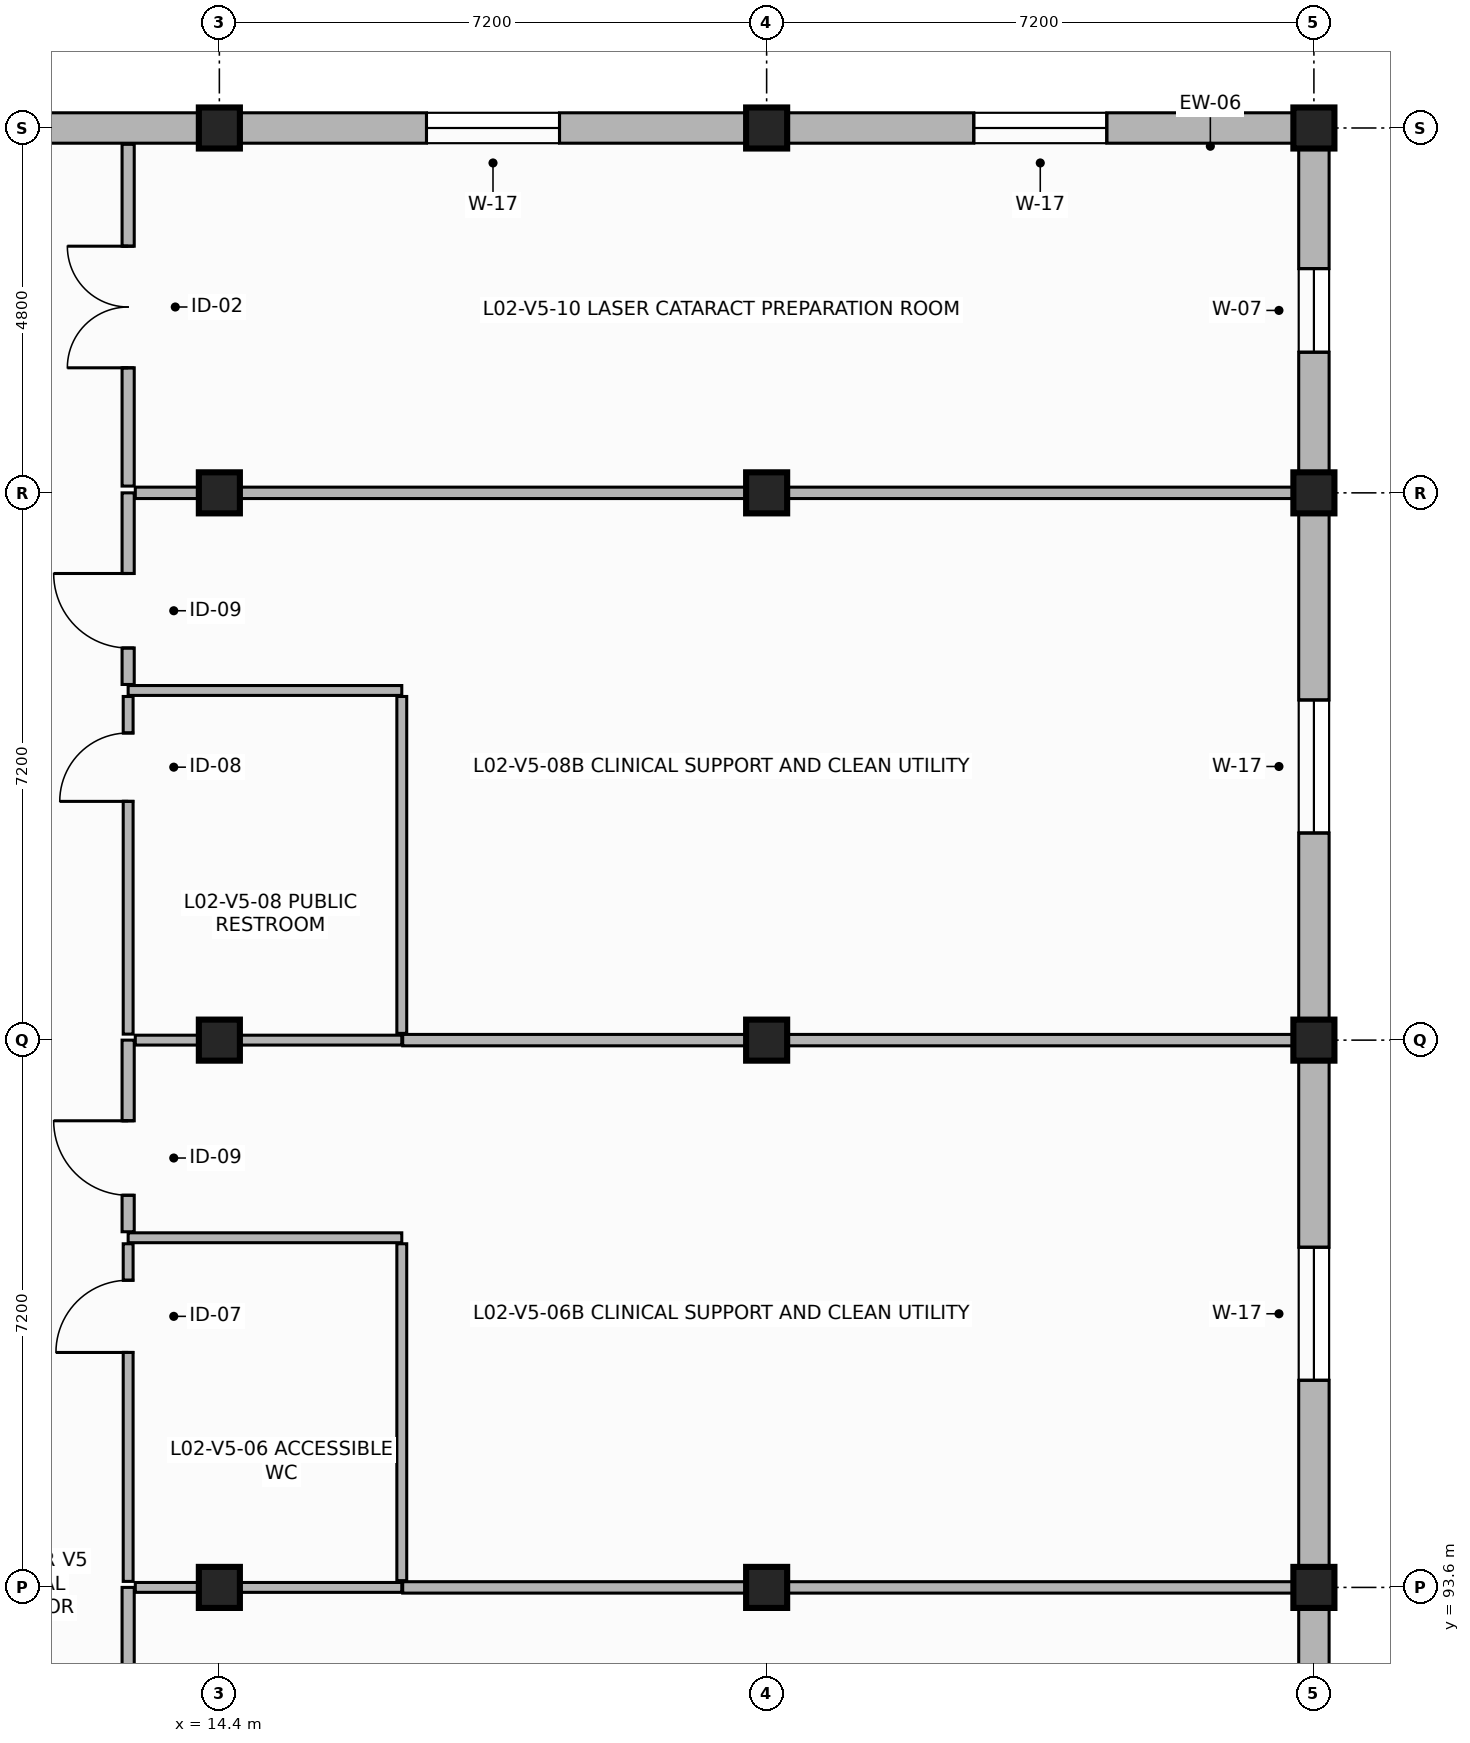
"""IFC4 building model, lengths in metres.
Left out: names, types, materials, properties, quantities, classifications, styles, units other than length and angle.
Written with IfcOpenShell. Run it as: python <this file> out.ifc"""

import sys

from ifc_helpers import new_model, si_unit, direction, frame, frame_2d, origin, origin_2d, place, context, subcontext, project, spatial, rectangle, extrude, element, fill, save


model = new_model("IFC4")
c1 = context("Model", 3, precision=1e-05, world=origin(), true_north=direction((0.0, 1.0)))
c2 = subcontext(c1, "Body", "Model", "MODEL_VIEW")
j1 = project(units=[si_unit("LENGTHUNIT", "METRE"), si_unit("PLANEANGLEUNIT", "RADIAN")], contexts=[c1])
p1 = place(None, origin())
s1 = spatial("IfcSite", under=j1, at=p1, CompositionType="ELEMENT")
p2 = place(p1, origin())
s2 = spatial("IfcBuilding", under=s1, at=p2, CompositionType="ELEMENT")
p3 = place(p2, frame((0.0, 0.0, 8.4)))
s3 = spatial("IfcBuildingStorey", under=s2, at=p3, CompositionType="ELEMENT", Elevation=8.4)
for number, where, z_axis, x_axis in (
    (1, (14.4, 93.6, 0.0), (0.0, 0.0, 1.0), (1.0, 0.0, 0.0)),
    (2, (14.4, 100.8, 0.0), (0.0, 0.0, 1.0), (1.0, 0.0, 0.0)),
    (3, (14.4, 108.0, 0.0), (0.0, 0.0, 1.0), (1.0, 0.0, 0.0)),
    (4, (14.4, 112.8, 0.0), (0.0, 0.0, 1.0), (1.0, 0.0, 0.0)),
    (5, (21.6, 93.6, 0.0), (0.0, 0.0, 1.0), (1.0, 0.0, 0.0)),
    (6, (21.6, 100.8, 0.0), (0.0, 0.0, 1.0), (1.0, 0.0, 0.0)),
    (7, (21.6, 108.0, 0.0), (0.0, 0.0, 1.0), (1.0, 0.0, 0.0)),
    (8, (21.6, 112.8, 0.0), (0.0, 0.0, 1.0), (1.0, 0.0, 0.0)),
    (9, (28.8, 93.6, 0.0), (0.0, 0.0, 1.0), (1.0, 0.0, 0.0)),
    (10, (28.8, 100.8, 0.0), (0.0, 0.0, 1.0), (1.0, 0.0, 0.0)),
    (11, (28.8, 108.0, 0.0), (0.0, 0.0, 1.0), (1.0, 0.0, 0.0)),
    (12, (28.8, 112.8, 0.0), (0.0, 0.0, 1.0), (1.0, 0.0, 0.0)),
):
    element("IfcColumn", number, at=place(p3, frame(where, z_axis=z_axis, x_axis=x_axis)), inside=s3, PredefinedType="COLUMN", context=c2, shape_type="SweptSolid", body=[
        extrude(rectangle(XDim=0.54, YDim=0.54, at=origin_2d()), origin(), (0.0, 0.0, 1.0), 3.59),
    ])
p4 = place(p3, frame((28.8, 86.4, 0.0), z_axis=(0.0, 0.0, 1.0), x_axis=(0.0, 1.0, 0.0)))
e13 = element("IfcWall", 13, at=p4, inside=s3, PredefinedType="SOLIDWALL", context=c2, shape_type="SweptSolid", body=[
    extrude(rectangle(XDim=7.2, YDim=0.4, at=frame_2d((3.6, 0.0))), origin(), (0.0, 0.0, 1.0), 2.92),
])
p5 = place(p4, frame((2.725, 0.0, 0.9)))
e14 = element("IfcOpeningElement", 14, at=p5, cuts=e13, PredefinedType="OPENING", context=c2, shape_type="SweptSolid", body=[
    extrude(rectangle(XDim=1.75, YDim=1.8, at=frame_2d((0.875, 0.9))), frame((0.0, 0.21, 0.0), z_axis=(0.0, -1.0, 0.0), x_axis=(1.0, 0.0, 0.0)), (0.0, 0.0, 1.0), 0.42),
])
p6 = place(p3, frame((28.8, 93.6, 0.0), z_axis=(0.0, 0.0, 1.0), x_axis=(0.0, 1.0, 0.0)))
e15 = element("IfcWall", 15, at=p6, inside=s3, PredefinedType="SOLIDWALL", context=c2, shape_type="SweptSolid", body=[
    extrude(rectangle(XDim=7.2, YDim=0.4, at=frame_2d((3.6, 0.0))), origin(), (0.0, 0.0, 1.0), 2.92),
])
p7 = place(p6, frame((2.725, 0.0, 0.9)))
e16 = element("IfcOpeningElement", 16, at=p7, cuts=e15, PredefinedType="OPENING", context=c2, shape_type="SweptSolid", body=[
    extrude(rectangle(XDim=1.75, YDim=1.8, at=frame_2d((0.875, 0.9))), frame((0.0, 0.21, 0.0), z_axis=(0.0, -1.0, 0.0), x_axis=(1.0, 0.0, 0.0)), (0.0, 0.0, 1.0), 0.42),
])
p8 = place(p3, frame((28.8, 100.8, 0.0), z_axis=(0.0, 0.0, 1.0), x_axis=(0.0, 1.0, 0.0)))
e17 = element("IfcWall", 17, at=p8, inside=s3, PredefinedType="SOLIDWALL", context=c2, shape_type="SweptSolid", body=[
    extrude(rectangle(XDim=7.2, YDim=0.4, at=frame_2d((3.6, 0.0))), origin(), (0.0, 0.0, 1.0), 2.92),
])
p9 = place(p8, frame((2.725, 0.0, 0.9)))
e18 = element("IfcOpeningElement", 18, at=p9, cuts=e17, PredefinedType="OPENING", context=c2, shape_type="SweptSolid", body=[
    extrude(rectangle(XDim=1.75, YDim=1.8, at=frame_2d((0.875, 0.9))), frame((0.0, 0.21, 0.0), z_axis=(0.0, -1.0, 0.0), x_axis=(1.0, 0.0, 0.0)), (0.0, 0.0, 1.0), 0.42),
])
p10 = place(p3, frame((28.8, 108.0, 0.0), z_axis=(0.0, 0.0, 1.0), x_axis=(0.0, 1.0, 0.0)))
e19 = element("IfcWall", 19, at=p10, inside=s3, PredefinedType="SOLIDWALL", context=c2, shape_type="SweptSolid", body=[
    extrude(rectangle(XDim=4.8, YDim=0.4, at=frame_2d((2.4, 0.0))), origin(), (0.0, 0.0, 1.0), 2.92),
])
p11 = place(p10, frame((1.85, 0.0, 0.85)))
e20 = element("IfcOpeningElement", 20, at=p11, cuts=e19, PredefinedType="OPENING", context=c2, shape_type="SweptSolid", body=[
    extrude(rectangle(XDim=1.1, YDim=1.85, at=frame_2d((0.55, 0.925))), frame((0.0, 0.21, 0.0), z_axis=(0.0, -1.0, 0.0), x_axis=(1.0, 0.0, 0.0)), (0.0, 0.0, 1.0), 0.42),
])
p12 = place(p3, frame((28.8, 112.8, 0.0), z_axis=(0.0, 0.0, 1.0), x_axis=(-1.0, 0.0, 0.0)))
e21 = element("IfcWall", 21, at=p12, inside=s3, PredefinedType="SOLIDWALL", context=c2, shape_type="SweptSolid", body=[
    extrude(rectangle(XDim=7.2, YDim=0.4, at=frame_2d((3.6, 0.0))), origin(), (0.0, 0.0, 1.0), 2.92),
])
p13 = place(p12, frame((2.725, 0.0, 0.9)))
e22 = element("IfcOpeningElement", 22, at=p13, cuts=e21, PredefinedType="OPENING", context=c2, shape_type="SweptSolid", body=[
    extrude(rectangle(XDim=1.75, YDim=1.8, at=frame_2d((0.875, 0.9))), frame((0.0, 0.21, 0.0), z_axis=(0.0, -1.0, 0.0), x_axis=(1.0, 0.0, 0.0)), (0.0, 0.0, 1.0), 0.42),
])
p14 = place(p3, frame((21.6, 112.8, 0.0), z_axis=(0.0, 0.0, 1.0), x_axis=(-1.0, 0.0, 0.0)))
e23 = element("IfcWall", 23, at=p14, inside=s3, PredefinedType="SOLIDWALL", context=c2, shape_type="SweptSolid", body=[
    extrude(rectangle(XDim=7.2, YDim=0.4, at=frame_2d((3.6, 0.0))), origin(), (0.0, 0.0, 1.0), 2.92),
])
p15 = place(p14, frame((2.725, 0.0, 0.9)))
e24 = element("IfcOpeningElement", 24, at=p15, cuts=e23, PredefinedType="OPENING", context=c2, shape_type="SweptSolid", body=[
    extrude(rectangle(XDim=1.75, YDim=1.8, at=frame_2d((0.875, 0.9))), frame((0.0, 0.21, 0.0), z_axis=(0.0, -1.0, 0.0), x_axis=(1.0, 0.0, 0.0)), (0.0, 0.0, 1.0), 0.42),
])
p16 = place(p3, frame((14.4, 112.8, 0.0), z_axis=(0.0, 0.0, 1.0), x_axis=(-1.0, 0.0, 0.0)))
e25 = element("IfcWall", 25, at=p16, inside=s3, PredefinedType="SOLIDWALL", context=c2, shape_type="SweptSolid", body=[
    extrude(rectangle(XDim=7.2, YDim=0.4, at=frame_2d((3.6, 0.0))), origin(), (0.0, 0.0, 1.0), 2.92),
])
p17 = place(p16, frame((4.725, 0.0, 0.9)))
e26 = element("IfcOpeningElement", 26, at=p17, cuts=e25, PredefinedType="OPENING", context=c2, shape_type="SweptSolid", body=[
    extrude(rectangle(XDim=1.75, YDim=1.8, at=frame_2d((0.875, 0.9))), frame((0.0, 0.21, 0.0), z_axis=(0.0, -1.0, 0.0), x_axis=(1.0, 0.0, 0.0)), (0.0, 0.0, 1.0), 0.42),
])
p18 = place(p3, frame((13.2, 86.509, 0.0), z_axis=(0.0, 0.0, 1.0), x_axis=(0.0, 1.0, 0.0)))
e27 = element("IfcWall", 27, at=p18, inside=s3, PredefinedType="PARTITIONING", context=c2, shape_type="SweptSolid", body=[
    extrude(rectangle(XDim=7.091, YDim=0.16, at=frame_2d((3.545, 0.0))), origin(), (0.0, 0.0, 1.0), 2.9),
])
p19 = place(p18, frame((3.055, 0.0, 0.0)))
e28 = element("IfcOpeningElement", 28, at=p19, cuts=e27, PredefinedType="OPENING", context=c2, shape_type="SweptSolid", body=[
    extrude(rectangle(XDim=0.98, YDim=2.15, at=frame_2d((0.49, 1.075))), frame((0.0, 0.09, 0.0), z_axis=(0.0, -1.0, 0.0), x_axis=(1.0, 0.0, 0.0)), (0.0, 0.0, 1.0), 0.18),
])
p20 = place(p3, frame((13.294, 93.6, 0.0), z_axis=(0.0, 0.0, 1.0), x_axis=(1.0, 0.0, 0.0)))
e29 = element("IfcWall", 29, at=p20, inside=s3, PredefinedType="PARTITIONING", context=c2, shape_type="SweptSolid", body=[
    extrude(rectangle(XDim=3.506, YDim=0.13, at=frame_2d((1.753, 0.0))), origin(), (0.0, 0.0, 1.0), 2.9),
])
p21 = place(p3, frame((16.812, 93.6, 0.0), z_axis=(0.0, 0.0, 1.0), x_axis=(1.0, 0.0, 0.0)))
e30 = element("IfcWall", 30, at=p21, inside=s3, PredefinedType="PARTITIONING", context=c2, shape_type="SweptSolid", body=[
    extrude(rectangle(XDim=11.773, YDim=0.15, at=frame_2d((5.886, 0.0))), origin(), (0.0, 0.0, 1.0), 2.9),
])
p22 = place(p3, frame((13.2, 98.2, 0.0), z_axis=(0.0, 0.0, 1.0), x_axis=(1.0, 0.0, 0.0)))
e31 = element("IfcWall", 31, at=p22, inside=s3, PredefinedType="PARTITIONING", context=c2, shape_type="SweptSolid", body=[
    extrude(rectangle(XDim=3.6, YDim=0.13, at=frame_2d((1.8, 0.0))), origin(), (0.0, 0.0, 1.0), 2.9),
])
p23 = place(p3, frame((16.8, 98.121, 0.0), z_axis=(0.0, 0.0, 1.0), x_axis=(0.0, -1.0, 0.0)))
e32 = element("IfcWall", 32, at=p23, inside=s3, PredefinedType="PARTITIONING", context=c2, shape_type="SweptSolid", body=[
    extrude(rectangle(XDim=4.432, YDim=0.13, at=frame_2d((2.216, 0.0))), origin(), (0.0, 0.0, 1.0), 2.9),
])
p24 = place(p3, frame((13.2, 93.679, 0.0), z_axis=(0.0, 0.0, 1.0), x_axis=(0.0, 1.0, 0.0)))
e33 = element("IfcWall", 33, at=p24, inside=s3, PredefinedType="PARTITIONING", context=c2, shape_type="SweptSolid", body=[
    extrude(rectangle(XDim=4.442, YDim=0.13, at=frame_2d((2.221, 0.0))), origin(), (0.0, 0.0, 1.0), 2.9),
])
p25 = place(p24, frame((3.012, 0.0, 0.0)))
e34 = element("IfcOpeningElement", 34, at=p25, cuts=e33, PredefinedType="OPENING", context=c2, shape_type="SweptSolid", body=[
    extrude(rectangle(XDim=0.95, YDim=2.1, at=frame_2d((0.475, 1.05))), frame((0.0, 0.075, 0.0), z_axis=(0.0, -1.0, 0.0), x_axis=(1.0, 0.0, 0.0)), (0.0, 0.0, 1.0), 0.15),
])
p26 = place(p3, frame((13.2, 98.279, 0.0), z_axis=(0.0, 0.0, 1.0), x_axis=(0.0, 1.0, 0.0)))
e35 = element("IfcWall", 35, at=p26, inside=s3, PredefinedType="PARTITIONING", context=c2, shape_type="SweptSolid", body=[
    extrude(rectangle(XDim=2.521, YDim=0.16, at=frame_2d((1.26, 0.0))), origin(), (0.0, 0.0, 1.0), 2.9),
])
p27 = place(p26, frame((0.48, 0.0, 0.0)))
e36 = element("IfcOpeningElement", 36, at=p27, cuts=e35, PredefinedType="OPENING", context=c2, shape_type="SweptSolid", body=[
    extrude(rectangle(XDim=0.98, YDim=2.15, at=frame_2d((0.49, 1.075))), frame((0.0, 0.09, 0.0), z_axis=(0.0, -1.0, 0.0), x_axis=(1.0, 0.0, 0.0)), (0.0, 0.0, 1.0), 0.18),
])
p28 = place(p3, frame((13.294, 100.8, 0.0), z_axis=(0.0, 0.0, 1.0), x_axis=(1.0, 0.0, 0.0)))
e37 = element("IfcWall", 37, at=p28, inside=s3, PredefinedType="PARTITIONING", context=c2, shape_type="SweptSolid", body=[
    extrude(rectangle(XDim=3.506, YDim=0.13, at=frame_2d((1.753, 0.0))), origin(), (0.0, 0.0, 1.0), 2.9),
])
p29 = place(p3, frame((16.812, 100.8, 0.0), z_axis=(0.0, 0.0, 1.0), x_axis=(1.0, 0.0, 0.0)))
e38 = element("IfcWall", 38, at=p29, inside=s3, PredefinedType="PARTITIONING", context=c2, shape_type="SweptSolid", body=[
    extrude(rectangle(XDim=11.773, YDim=0.15, at=frame_2d((5.886, 0.0))), origin(), (0.0, 0.0, 1.0), 2.9),
])
p30 = place(p3, frame((13.2, 105.4, 0.0), z_axis=(0.0, 0.0, 1.0), x_axis=(1.0, 0.0, 0.0)))
e39 = element("IfcWall", 39, at=p30, inside=s3, PredefinedType="PARTITIONING", context=c2, shape_type="SweptSolid", body=[
    extrude(rectangle(XDim=3.6, YDim=0.13, at=frame_2d((1.8, 0.0))), origin(), (0.0, 0.0, 1.0), 2.9),
])
p31 = place(p3, frame((16.8, 105.321, 0.0), z_axis=(0.0, 0.0, 1.0), x_axis=(0.0, -1.0, 0.0)))
e40 = element("IfcWall", 40, at=p31, inside=s3, PredefinedType="PARTITIONING", context=c2, shape_type="SweptSolid", body=[
    extrude(rectangle(XDim=4.432, YDim=0.13, at=frame_2d((2.216, 0.0))), origin(), (0.0, 0.0, 1.0), 2.9),
])
p32 = place(p3, frame((13.2, 100.879, 0.0), z_axis=(0.0, 0.0, 1.0), x_axis=(0.0, 1.0, 0.0)))
e41 = element("IfcWall", 41, at=p32, inside=s3, PredefinedType="PARTITIONING", context=c2, shape_type="SweptSolid", body=[
    extrude(rectangle(XDim=4.442, YDim=0.13, at=frame_2d((2.221, 0.0))), origin(), (0.0, 0.0, 1.0), 2.9),
])
p33 = place(p32, frame((3.062, 0.0, 0.0)))
e42 = element("IfcOpeningElement", 42, at=p33, cuts=e41, PredefinedType="OPENING", context=c2, shape_type="SweptSolid", body=[
    extrude(rectangle(XDim=0.9, YDim=2.1, at=frame_2d((0.45, 1.05))), frame((0.0, 0.075, 0.0), z_axis=(0.0, -1.0, 0.0), x_axis=(1.0, 0.0, 0.0)), (0.0, 0.0, 1.0), 0.15),
])
p34 = place(p3, frame((13.2, 105.479, 0.0), z_axis=(0.0, 0.0, 1.0), x_axis=(0.0, 1.0, 0.0)))
e43 = element("IfcWall", 43, at=p34, inside=s3, PredefinedType="PARTITIONING", context=c2, shape_type="SweptSolid", body=[
    extrude(rectangle(XDim=2.521, YDim=0.16, at=frame_2d((1.26, 0.0))), origin(), (0.0, 0.0, 1.0), 2.9),
])
p35 = place(p34, frame((0.48, 0.0, 0.0)))
e44 = element("IfcOpeningElement", 44, at=p35, cuts=e43, PredefinedType="OPENING", context=c2, shape_type="SweptSolid", body=[
    extrude(rectangle(XDim=0.98, YDim=2.15, at=frame_2d((0.49, 1.075))), frame((0.0, 0.09, 0.0), z_axis=(0.0, -1.0, 0.0), x_axis=(1.0, 0.0, 0.0)), (0.0, 0.0, 1.0), 0.18),
])
p36 = place(p3, frame((13.294, 108.0, 0.0), z_axis=(0.0, 0.0, 1.0), x_axis=(1.0, 0.0, 0.0)))
e45 = element("IfcWall", 45, at=p36, inside=s3, PredefinedType="PARTITIONING", context=c2, shape_type="SweptSolid", body=[
    extrude(rectangle(XDim=15.291, YDim=0.15, at=frame_2d((7.646, 0.0))), origin(), (0.0, 0.0, 1.0), 2.9),
])
p37 = place(p3, frame((13.2, 108.089, 0.0), z_axis=(0.0, 0.0, 1.0), x_axis=(0.0, 1.0, 0.0)))
e46 = element("IfcWall", 46, at=p37, inside=s3, PredefinedType="PARTITIONING", context=c2, shape_type="SweptSolid", body=[
    extrude(rectangle(XDim=4.496, YDim=0.16, at=frame_2d((2.248, 0.0))), origin(), (0.0, 0.0, 1.0), 2.9),
])
p38 = place(p37, frame((1.556, 0.0, 0.0)))
e47 = element("IfcOpeningElement", 47, at=p38, cuts=e46, PredefinedType="OPENING", context=c2, shape_type="SweptSolid", body=[
    extrude(rectangle(XDim=1.6, YDim=2.3, at=frame_2d((0.8, 1.15))), frame((0.0, 0.09, 0.0), z_axis=(0.0, -1.0, 0.0), x_axis=(1.0, 0.0, 0.0)), (0.0, 0.0, 1.0), 0.18),
])
p39 = place(p7, origin())
e48 = element("IfcWindow", 48, at=p39, inside=s3, PartitioningType="SINGLE_PANEL", PredefinedType="WINDOW", context=c2, shape_type="SweptSolid", body=[
    extrude(rectangle(XDim=1.75, YDim=1.8, at=frame_2d((0.875, 0.9))), frame((0.0, 0.03, 0.0), z_axis=(0.0, -1.0, 0.0), x_axis=(1.0, 0.0, 0.0)), (0.0, 0.0, 1.0), 0.06),
])
fill(e16, e48)
p40 = place(p9, origin())
e49 = element("IfcWindow", 49, at=p40, inside=s3, PartitioningType="SINGLE_PANEL", PredefinedType="WINDOW", context=c2, shape_type="SweptSolid", body=[
    extrude(rectangle(XDim=1.75, YDim=1.8, at=frame_2d((0.875, 0.9))), frame((0.0, 0.03, 0.0), z_axis=(0.0, -1.0, 0.0), x_axis=(1.0, 0.0, 0.0)), (0.0, 0.0, 1.0), 0.06),
])
fill(e18, e49)
p41 = place(p11, origin())
e50 = element("IfcWindow", 50, at=p41, inside=s3, PartitioningType="SINGLE_PANEL", PredefinedType="WINDOW", context=c2, shape_type="SweptSolid", body=[
    extrude(rectangle(XDim=1.1, YDim=1.85, at=frame_2d((0.55, 0.925))), frame((0.0, 0.03, 0.0), z_axis=(0.0, -1.0, 0.0), x_axis=(1.0, 0.0, 0.0)), (0.0, 0.0, 1.0), 0.06),
])
fill(e20, e50)
p42 = place(p13, origin())
e51 = element("IfcWindow", 51, at=p42, inside=s3, PartitioningType="SINGLE_PANEL", PredefinedType="WINDOW", context=c2, shape_type="SweptSolid", body=[
    extrude(rectangle(XDim=1.75, YDim=1.8, at=frame_2d((0.875, 0.9))), frame((0.0, 0.03, 0.0), z_axis=(0.0, -1.0, 0.0), x_axis=(1.0, 0.0, 0.0)), (0.0, 0.0, 1.0), 0.06),
])
fill(e22, e51)
p43 = place(p15, origin())
e52 = element("IfcWindow", 52, at=p43, inside=s3, PartitioningType="SINGLE_PANEL", PredefinedType="WINDOW", context=c2, shape_type="SweptSolid", body=[
    extrude(rectangle(XDim=1.75, YDim=1.8, at=frame_2d((0.875, 0.9))), frame((0.0, 0.03, 0.0), z_axis=(0.0, -1.0, 0.0), x_axis=(1.0, 0.0, 0.0)), (0.0, 0.0, 1.0), 0.06),
])
fill(e24, e52)
p44 = place(p25, origin())
e53 = element("IfcDoor", 53, at=p44, inside=s3, OperationType="SINGLE_SWING_LEFT", PredefinedType="DOOR", context=c2, shape_type="SweptSolid", body=[
    extrude(rectangle(XDim=0.95, YDim=2.1, at=frame_2d((0.475, 1.05))), frame((0.0, 0.025, 0.0), z_axis=(0.0, -1.0, 0.0), x_axis=(1.0, 0.0, 0.0)), (0.0, 0.0, 1.0), 0.05),
])
fill(e34, e53)
p45 = place(p27, origin())
e54 = element("IfcDoor", 54, at=p45, inside=s3, OperationType="SINGLE_SWING_RIGHT", PredefinedType="DOOR", context=c2, shape_type="SweptSolid", body=[
    extrude(rectangle(XDim=0.98, YDim=2.15, at=frame_2d((0.49, 1.075))), frame((0.0, 0.025, 0.0), z_axis=(0.0, -1.0, 0.0), x_axis=(1.0, 0.0, 0.0)), (0.0, 0.0, 1.0), 0.05),
])
fill(e36, e54)
p46 = place(p33, origin())
e55 = element("IfcDoor", 55, at=p46, inside=s3, OperationType="SINGLE_SWING_LEFT", PredefinedType="DOOR", context=c2, shape_type="SweptSolid", body=[
    extrude(rectangle(XDim=0.9, YDim=2.1, at=frame_2d((0.45, 1.05))), frame((0.0, 0.025, 0.0), z_axis=(0.0, -1.0, 0.0), x_axis=(1.0, 0.0, 0.0)), (0.0, 0.0, 1.0), 0.05),
])
fill(e42, e55)
p47 = place(p35, origin())
e56 = element("IfcDoor", 56, at=p47, inside=s3, OperationType="SINGLE_SWING_RIGHT", PredefinedType="DOOR", context=c2, shape_type="SweptSolid", body=[
    extrude(rectangle(XDim=0.98, YDim=2.15, at=frame_2d((0.49, 1.075))), frame((0.0, 0.025, 0.0), z_axis=(0.0, -1.0, 0.0), x_axis=(1.0, 0.0, 0.0)), (0.0, 0.0, 1.0), 0.05),
])
fill(e44, e56)
p48 = place(p38, origin())
e57 = element("IfcDoor", 57, at=p48, inside=s3, OperationType="DOUBLE_DOOR_SINGLE_SWING", PredefinedType="DOOR", context=c2, shape_type="SweptSolid", body=[
    extrude(rectangle(XDim=1.6, YDim=2.3, at=frame_2d((0.8, 1.15))), frame((0.0, 0.025, 0.0), z_axis=(0.0, -1.0, 0.0), x_axis=(1.0, 0.0, 0.0)), (0.0, 0.0, 1.0), 0.05),
])
fill(e47, e57)
save(model, sys.argv[1])
